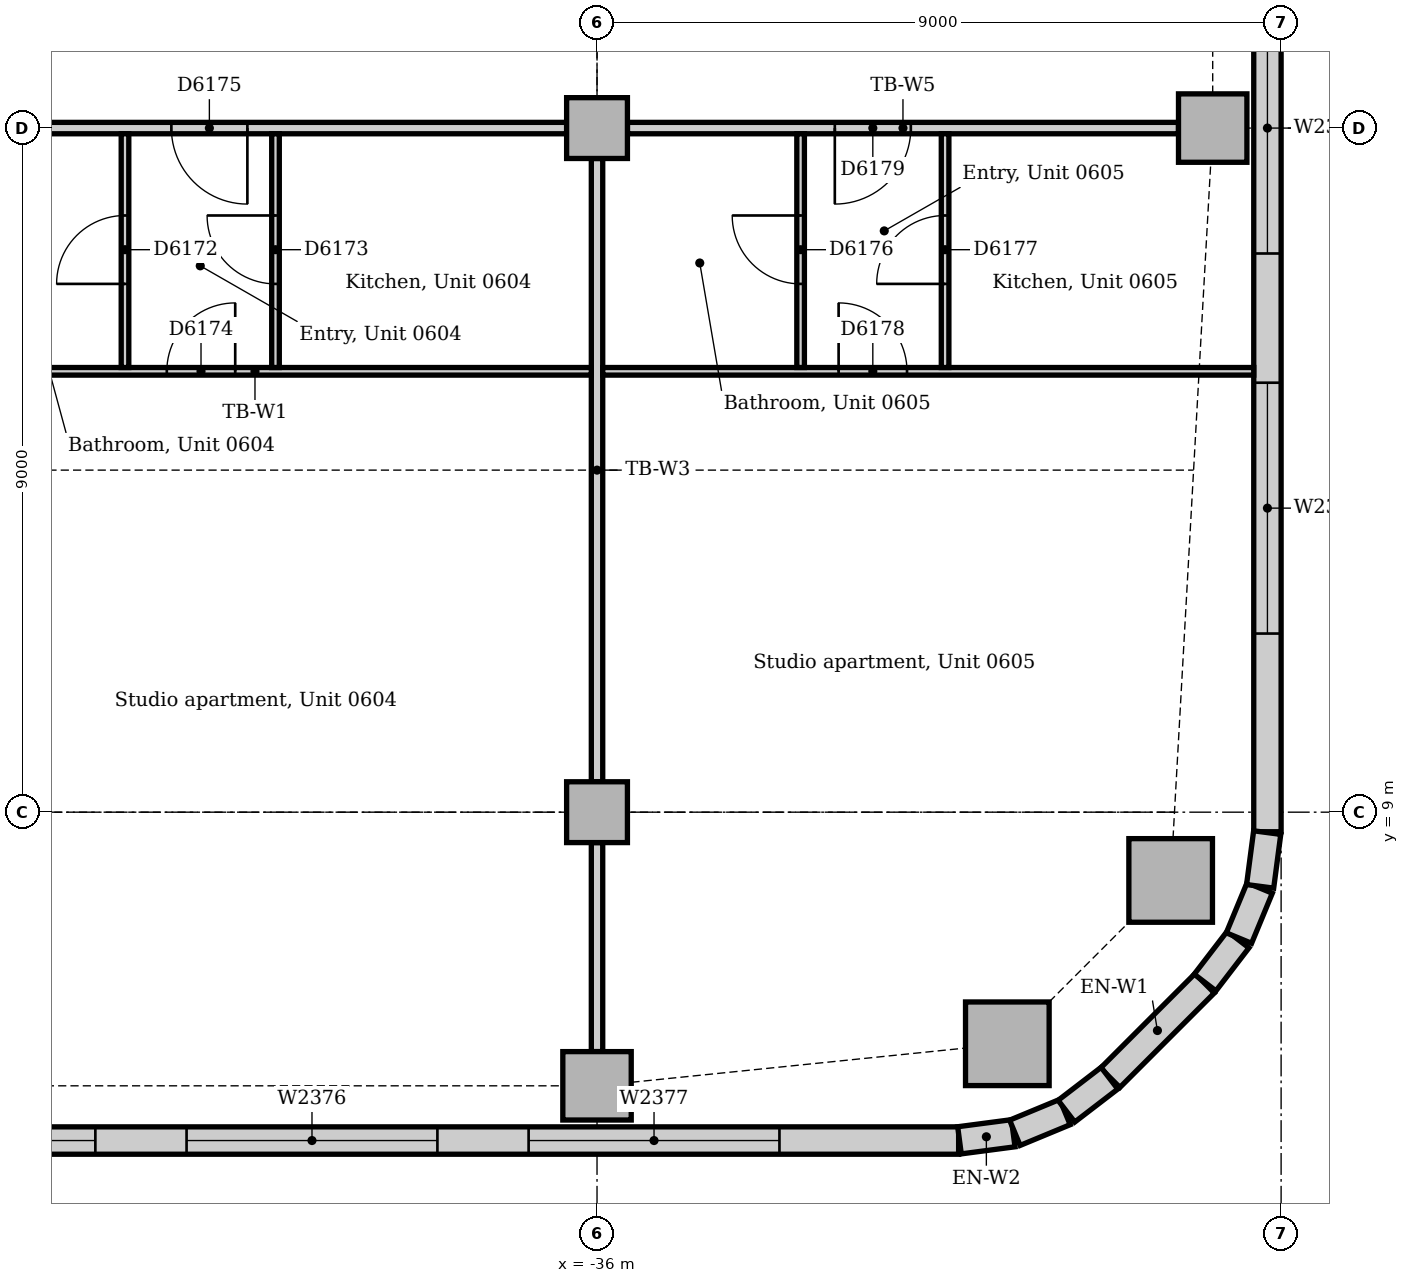
"""IFC4 building model, lengths in metres.
Left out: names, types, materials, properties, quantities, classifications, styles, units other than length and angle.
Written with IfcOpenShell. Run it as: python <this file> out.ifc"""

import sys

from ifc_helpers import new_model, si_unit, direction, frame, frame_2d, origin, origin_2d, place, context, subcontext, project, spatial, rectangle, extrude, element, fill, save


model = new_model("IFC4")
c1 = context("Model", 3, precision=1e-05, world=origin(), true_north=direction((0.0, 1.0)))
c2 = subcontext(c1, "Body", "Model", "MODEL_VIEW")
j1 = project(units=[si_unit("LENGTHUNIT", "METRE"), si_unit("PLANEANGLEUNIT", "RADIAN")], contexts=[c1])
p1 = place(None, origin())
s1 = spatial("IfcSite", under=j1, at=p1, CompositionType="ELEMENT")
p2 = place(p1, origin())
s2 = spatial("IfcBuilding", under=s1, at=p2, CompositionType="ELEMENT")
p3 = place(p2, frame((0.0, 0.0, 30.0)))
s3 = spatial("IfcBuildingStorey", under=s2, at=p3, CompositionType="ELEMENT", Elevation=30.0)
for number, where, z_axis, x_axis in (
    (1, (-30.602, 5.953, 0.0), (0.0, 0.0, 1.0), (1.0, 0.0, 0.0)),
    (2, (-28.453, 8.102, 0.0), (0.0, 0.0, 1.0), (1.0, 0.0, 0.0)),
):
    element("IfcColumn", number, at=place(p3, frame(where, z_axis=z_axis, x_axis=x_axis)), inside=s3, PredefinedType="COLUMN", context=c2, shape_type="SweptSolid", body=[
        extrude(rectangle(XDim=1.1, YDim=1.1, at=origin_2d()), origin(), (0.0, 0.0, 1.0), 3.85),
    ])
for number, where, z_axis, x_axis in (
    (3, (-36.0, 5.4, 0.0), (0.0, 0.0, 1.0), (1.0, 0.0, 0.0)),
    (4, (-27.9, 18.0, 0.0), (0.0, 0.0, 1.0), (1.0, 0.0, 0.0)),
):
    element("IfcColumn", number, at=place(p3, frame(where, z_axis=z_axis, x_axis=x_axis)), inside=s3, PredefinedType="COLUMN", context=c2, shape_type="SweptSolid", body=[
        extrude(rectangle(XDim=0.9, YDim=0.9, at=origin_2d()), origin(), (0.0, 0.0, 1.0), 3.85),
    ])
for number, where, z_axis, x_axis in (
    (5, (-36.0, 9.0, 0.0), (0.0, 0.0, 1.0), (1.0, 0.0, 0.0)),
    (6, (-36.0, 18.0, 0.0), (0.0, 0.0, 1.0), (1.0, 0.0, 0.0)),
):
    element("IfcColumn", number, at=place(p3, frame(where, z_axis=z_axis, x_axis=x_axis)), inside=s3, PredefinedType="COLUMN", context=c2, shape_type="SweptSolid", body=[
        extrude(rectangle(XDim=0.8, YDim=0.8, at=origin_2d()), origin(), (0.0, 0.0, 1.0), 3.85),
    ])
p4 = place(p3, frame((-61.757, 4.68, 0.0), z_axis=(0.0, 0.0, 1.0), x_axis=(1.0, 0.0, 0.0)))
e7 = element("IfcWall", 7, at=p4, inside=s3, PredefinedType="STANDARD", context=c2, shape_type="SweptSolid", body=[
    extrude(rectangle(XDim=30.515, YDim=0.36, at=frame_2d((15.257, 0.0))), origin(), (0.0, 0.0, 1.0), 3.85),
])
p5 = place(p4, frame((2.357, 0.0, 0.9)))
e8 = element("IfcOpeningElement", 8, at=p5, cuts=e7, PredefinedType="OPENING", context=c2, shape_type="SweptSolid", body=[
    extrude(rectangle(XDim=3.3, YDim=1.6, at=frame_2d((1.65, 0.8))), frame((0.0, 0.19, 0.0), z_axis=(0.0, -1.0, 0.0), x_axis=(1.0, 0.0, 0.0)), (0.0, 0.0, 1.0), 0.38),
])
p6 = place(p4, frame((6.857, 0.0, 0.9)))
e9 = element("IfcOpeningElement", 9, at=p6, cuts=e7, PredefinedType="OPENING", context=c2, shape_type="SweptSolid", body=[
    extrude(rectangle(XDim=3.3, YDim=1.6, at=frame_2d((1.65, 0.8))), frame((0.0, 0.19, 0.0), z_axis=(0.0, -1.0, 0.0), x_axis=(1.0, 0.0, 0.0)), (0.0, 0.0, 1.0), 0.38),
])
p7 = place(p4, frame((11.357, 0.0, 0.9)))
e10 = element("IfcOpeningElement", 10, at=p7, cuts=e7, PredefinedType="OPENING", context=c2, shape_type="SweptSolid", body=[
    extrude(rectangle(XDim=3.3, YDim=1.6, at=frame_2d((1.65, 0.8))), frame((0.0, 0.19, 0.0), z_axis=(0.0, -1.0, 0.0), x_axis=(1.0, 0.0, 0.0)), (0.0, 0.0, 1.0), 0.38),
])
p8 = place(p4, frame((15.857, 0.0, 0.9)))
e11 = element("IfcOpeningElement", 11, at=p8, cuts=e7, PredefinedType="OPENING", context=c2, shape_type="SweptSolid", body=[
    extrude(rectangle(XDim=3.3, YDim=1.6, at=frame_2d((1.65, 0.8))), frame((0.0, 0.19, 0.0), z_axis=(0.0, -1.0, 0.0), x_axis=(1.0, 0.0, 0.0)), (0.0, 0.0, 1.0), 0.38),
])
p9 = place(p4, frame((20.357, 0.0, 0.9)))
e12 = element("IfcOpeningElement", 12, at=p9, cuts=e7, PredefinedType="OPENING", context=c2, shape_type="SweptSolid", body=[
    extrude(rectangle(XDim=3.3, YDim=1.6, at=frame_2d((1.65, 0.8))), frame((0.0, 0.19, 0.0), z_axis=(0.0, -1.0, 0.0), x_axis=(1.0, 0.0, 0.0)), (0.0, 0.0, 1.0), 0.38),
])
p10 = place(p4, frame((24.857, 0.0, 0.9)))
e13 = element("IfcOpeningElement", 13, at=p10, cuts=e7, PredefinedType="OPENING", context=c2, shape_type="SweptSolid", body=[
    extrude(rectangle(XDim=3.3, YDim=1.6, at=frame_2d((1.65, 0.8))), frame((0.0, 0.19, 0.0), z_axis=(0.0, -1.0, 0.0), x_axis=(1.0, 0.0, 0.0)), (0.0, 0.0, 1.0), 0.38),
])
p11 = place(p3, frame((-29.249, 5.506, 0.0), z_axis=(0.0, 0.0, 1.0), x_axis=(0.707106781187, 0.707106781187, 0.0)))
e14 = element("IfcWall", 14, at=p11, inside=s3, PredefinedType="STANDARD", context=c2, shape_type="SweptSolid", body=[
    extrude(rectangle(XDim=1.757, YDim=0.36, at=frame_2d((0.879, 0.0))), origin(), (0.0, 0.0, 1.0), 3.85),
])
p12 = place(p3, frame((-27.18, 8.743, 0.0), z_axis=(0.0, 0.0, 1.0), x_axis=(0.0, 1.0, 0.0)))
e15 = element("IfcWall", 15, at=p12, inside=s3, PredefinedType="STANDARD", context=c2, shape_type="SweptSolid", body=[
    extrude(rectangle(XDim=12.257, YDim=0.36, at=frame_2d((6.129, 0.0))), origin(), (0.0, 0.0, 1.0), 3.85),
])
p13 = place(p12, frame((2.607, 0.0, 0.9)))
e16 = element("IfcOpeningElement", 16, at=p13, cuts=e15, PredefinedType="OPENING", context=c2, shape_type="SweptSolid", body=[
    extrude(rectangle(XDim=3.3, YDim=1.6, at=frame_2d((1.65, 0.8))), frame((0.0, 0.19, 0.0), z_axis=(0.0, -1.0, 0.0), x_axis=(1.0, 0.0, 0.0)), (0.0, 0.0, 1.0), 0.38),
])
p14 = place(p12, frame((7.607, 0.0, 0.9)))
e17 = element("IfcOpeningElement", 17, at=p14, cuts=e15, PredefinedType="OPENING", context=c2, shape_type="SweptSolid", body=[
    extrude(rectangle(XDim=3.3, YDim=1.6, at=frame_2d((1.65, 0.8))), frame((0.0, 0.19, 0.0), z_axis=(0.0, -1.0, 0.0), x_axis=(1.0, 0.0, 0.0)), (0.0, 0.0, 1.0), 0.38),
])
for number, where, z_axis, x_axis in (
    (18, (-31.231, 4.683, 0.0), (0.0, 0.0, 1.0), (0.991, 0.131, 0.0)),
    (19, (-30.503, 4.782, 0.0), (0.0, 0.0, 1.0), (0.924, 0.383, 0.0)),
):
    element("IfcWall", number, at=place(p3, frame(where, z_axis=z_axis, x_axis=x_axis)), inside=s3, PredefinedType="STANDARD", context=c2, shape_type="SweptSolid", body=[
        extrude(rectangle(XDim=0.713, YDim=0.36, at=frame_2d((0.356, 0.0))), origin(), (0.0, 0.0, 1.0), 3.85),
    ])
for number, where, z_axis, x_axis in (
    (20, (-29.825, 5.066, 0.0), (0.0, 0.0, 1.0), (0.793, 0.609, 0.0)),
    (21, (-28.0, 6.759, 0.0), (0.0, 0.0, 1.0), (0.609, 0.793, 0.0)),
):
    element("IfcWall", number, at=place(p3, frame(where, z_axis=z_axis, x_axis=x_axis)), inside=s3, PredefinedType="STANDARD", context=c2, shape_type="SweptSolid", body=[
        extrude(rectangle(XDim=0.713, YDim=0.36, at=frame_2d((0.357, 0.0))), origin(), (0.0, 0.0, 1.0), 3.85),
    ])
for number, where, z_axis, x_axis in (
    (22, (-27.555, 7.344, 0.0), (0.0, 0.0, 1.0), (0.383, 0.924, 0.0)),
    (23, (-27.276, 8.024, 0.0), (0.0, 0.0, 1.0), (0.131, 0.991, 0.0)),
):
    element("IfcWall", number, at=place(p3, frame(where, z_axis=z_axis, x_axis=x_axis)), inside=s3, PredefinedType="STANDARD", context=c2, shape_type="SweptSolid", body=[
        extrude(rectangle(XDim=0.713, YDim=0.36, at=frame_2d((0.356, 0.0))), origin(), (0.0, 0.0, 1.0), 3.85),
    ])
p15 = place(p3, frame((-35.6, 18.0, 0.0), z_axis=(0.0, 0.0, 1.0), x_axis=(1.0, 0.0, 0.0)))
e24 = element("IfcWall", 24, at=p15, inside=s3, PredefinedType="PARTITIONING", context=c2, shape_type="SweptSolid", body=[
    extrude(rectangle(XDim=7.25, YDim=0.15, at=frame_2d((3.625, 0.0))), origin(), (0.0, 0.0, 1.0), 3.15),
])
p16 = place(p15, frame((2.728, 0.0, 0.0)))
e25 = element("IfcOpeningElement", 25, at=p16, cuts=e24, PredefinedType="OPENING", context=c2, shape_type="SweptSolid", body=[
    extrude(rectangle(XDim=1.0, YDim=2.1, at=frame_2d((0.5, 1.05))), frame((0.0, 0.085, 0.0), z_axis=(0.0, -1.0, 0.0), x_axis=(1.0, 0.0, 0.0)), (0.0, 0.0, 1.0), 0.17),
])
p17 = place(p3, frame((-44.6, 18.0, 0.0), z_axis=(0.0, 0.0, 1.0), x_axis=(1.0, 0.0, 0.0)))
e26 = element("IfcWall", 26, at=p17, inside=s3, PredefinedType="PARTITIONING", context=c2, shape_type="SweptSolid", body=[
    extrude(rectangle(XDim=8.2, YDim=0.15, at=frame_2d((4.1, 0.0))), origin(), (0.0, 0.0, 1.0), 3.15),
])
p18 = place(p17, frame((3.0, 0.0, 0.0)))
e27 = element("IfcOpeningElement", 27, at=p18, cuts=e26, PredefinedType="OPENING", context=c2, shape_type="SweptSolid", body=[
    extrude(rectangle(XDim=1.0, YDim=2.1, at=frame_2d((0.5, 1.05))), frame((0.0, 0.085, 0.0), z_axis=(0.0, -1.0, 0.0), x_axis=(1.0, 0.0, 0.0)), (0.0, 0.0, 1.0), 0.17),
])
p19 = place(p3, frame((-36.0, 9.4, 0.0), z_axis=(0.0, 0.0, 1.0), x_axis=(0.0, 1.0, 0.0)))
e28 = element("IfcWall", 28, at=p19, inside=s3, PredefinedType="PARTITIONING", context=c2, shape_type="SweptSolid", body=[
    extrude(rectangle(XDim=8.2, YDim=0.15, at=frame_2d((4.1, 0.0))), origin(), (0.0, 0.0, 1.0), 3.158),
])
p20 = place(p3, frame((-36.0, 5.85, 0.0), z_axis=(0.0, 0.0, 1.0), x_axis=(0.0, 1.0, 0.0)))
e29 = element("IfcWall", 29, at=p20, inside=s3, PredefinedType="PARTITIONING", context=c2, shape_type="SweptSolid", body=[
    extrude(rectangle(XDim=2.75, YDim=0.15, at=frame_2d((1.375, 0.0))), origin(), (0.0, 0.0, 1.0), 3.652),
])
p21 = place(p3, frame((-44.925, 14.8, 0.0), z_axis=(0.0, 0.0, 1.0), x_axis=(1.0, 0.0, 0.0)))
e30 = element("IfcWall", 30, at=p21, inside=s3, PredefinedType="PARTITIONING", context=c2, shape_type="SweptSolid", body=[
    extrude(rectangle(XDim=8.85, YDim=0.1, at=frame_2d((4.425, 0.0))), origin(), (0.0, 0.0, 1.0), 3.85),
])
p22 = place(p21, frame((3.265, 0.0, 0.0)))
e31 = element("IfcOpeningElement", 31, at=p22, cuts=e30, PredefinedType="OPENING", context=c2, shape_type="SweptSolid", body=[
    extrude(rectangle(XDim=0.9, YDim=2.1, at=frame_2d((0.45, 1.05))), frame((0.0, 0.06, 0.0), z_axis=(0.0, -1.0, 0.0), x_axis=(1.0, 0.0, 0.0)), (0.0, 0.0, 1.0), 0.12),
])
p23 = place(p3, frame((-35.925, 14.8, 0.0), z_axis=(0.0, 0.0, 1.0), x_axis=(1.0, 0.0, 0.0)))
e32 = element("IfcWall", 32, at=p23, inside=s3, PredefinedType="PARTITIONING", context=c2, shape_type="SweptSolid", body=[
    extrude(rectangle(XDim=8.565, YDim=0.1, at=frame_2d((4.282, 0.0))), origin(), (0.0, 0.0, 1.0), 3.85),
])
p24 = place(p23, frame((3.103, 0.0, 0.0)))
e33 = element("IfcOpeningElement", 33, at=p24, cuts=e32, PredefinedType="OPENING", context=c2, shape_type="SweptSolid", body=[
    extrude(rectangle(XDim=0.9, YDim=2.1, at=frame_2d((0.45, 1.05))), frame((0.0, 0.06, 0.0), z_axis=(0.0, -1.0, 0.0), x_axis=(1.0, 0.0, 0.0)), (0.0, 0.0, 1.0), 0.12),
])
p25 = place(p3, frame((-42.21, 14.85, 0.0), z_axis=(0.0, 0.0, 1.0), x_axis=(0.0, 1.0, 0.0)))
e34 = element("IfcWall", 34, at=p25, inside=s3, PredefinedType="PARTITIONING", context=c2, shape_type="SweptSolid", body=[
    extrude(rectangle(XDim=3.075, YDim=0.1, at=frame_2d((1.538, 0.0))), origin(), (0.0, 0.0, 1.0), 3.85),
])
p26 = place(p25, frame((1.1, 0.0, 0.0)))
e35 = element("IfcOpeningElement", 35, at=p26, cuts=e34, PredefinedType="OPENING", context=c2, shape_type="SweptSolid", body=[
    extrude(rectangle(XDim=0.9, YDim=2.1, at=frame_2d((0.45, 1.05))), frame((0.0, 0.06, 0.0), z_axis=(0.0, -1.0, 0.0), x_axis=(1.0, 0.0, 0.0)), (0.0, 0.0, 1.0), 0.12),
])
p27 = place(p3, frame((-40.23, 14.85, 0.0), z_axis=(0.0, 0.0, 1.0), x_axis=(0.0, 1.0, 0.0)))
e36 = element("IfcWall", 36, at=p27, inside=s3, PredefinedType="PARTITIONING", context=c2, shape_type="SweptSolid", body=[
    extrude(rectangle(XDim=3.075, YDim=0.1, at=frame_2d((1.538, 0.0))), origin(), (0.0, 0.0, 1.0), 3.85),
])
p28 = place(p27, frame((1.1, 0.0, 0.0)))
e37 = element("IfcOpeningElement", 37, at=p28, cuts=e36, PredefinedType="OPENING", context=c2, shape_type="SweptSolid", body=[
    extrude(rectangle(XDim=0.9, YDim=2.1, at=frame_2d((0.45, 1.05))), frame((0.0, 0.06, 0.0), z_axis=(0.0, -1.0, 0.0), x_axis=(1.0, 0.0, 0.0)), (0.0, 0.0, 1.0), 0.12),
])
p29 = place(p3, frame((-33.322, 14.85, 0.0), z_axis=(0.0, 0.0, 1.0), x_axis=(0.0, 1.0, 0.0)))
e38 = element("IfcWall", 38, at=p29, inside=s3, PredefinedType="PARTITIONING", context=c2, shape_type="SweptSolid", body=[
    extrude(rectangle(XDim=3.075, YDim=0.1, at=frame_2d((1.538, 0.0))), origin(), (0.0, 0.0, 1.0), 3.85),
])
p30 = place(p29, frame((1.1, 0.0, 0.0)))
e39 = element("IfcOpeningElement", 39, at=p30, cuts=e38, PredefinedType="OPENING", context=c2, shape_type="SweptSolid", body=[
    extrude(rectangle(XDim=0.9, YDim=2.1, at=frame_2d((0.45, 1.05))), frame((0.0, 0.06, 0.0), z_axis=(0.0, -1.0, 0.0), x_axis=(1.0, 0.0, 0.0)), (0.0, 0.0, 1.0), 0.12),
])
p31 = place(p3, frame((-31.421, 14.85, 0.0), z_axis=(0.0, 0.0, 1.0), x_axis=(0.0, 1.0, 0.0)))
e40 = element("IfcWall", 40, at=p31, inside=s3, PredefinedType="PARTITIONING", context=c2, shape_type="SweptSolid", body=[
    extrude(rectangle(XDim=3.075, YDim=0.1, at=frame_2d((1.538, 0.0))), origin(), (0.0, 0.0, 1.0), 3.85),
])
p32 = place(p31, frame((1.1, 0.0, 0.0)))
e41 = element("IfcOpeningElement", 41, at=p32, cuts=e40, PredefinedType="OPENING", context=c2, shape_type="SweptSolid", body=[
    extrude(rectangle(XDim=0.9, YDim=2.1, at=frame_2d((0.45, 1.05))), frame((0.0, 0.06, 0.0), z_axis=(0.0, -1.0, 0.0), x_axis=(1.0, 0.0, 0.0)), (0.0, 0.0, 1.0), 0.12),
])
p33 = place(p8, origin())
e42 = element("IfcWindow", 42, at=p33, inside=s3, PartitioningType="SINGLE_PANEL", PredefinedType="WINDOW", context=c2, shape_type="SweptSolid", body=[
    extrude(rectangle(XDim=3.3, YDim=1.6, at=frame_2d((1.65, 0.8))), frame((0.0, 0.13, 0.0), z_axis=(0.0, -1.0, 0.0), x_axis=(1.0, 0.0, 0.0)), (0.0, 0.0, 1.0), 0.06),
])
fill(e11, e42)
p34 = place(p9, origin())
e43 = element("IfcWindow", 43, at=p34, inside=s3, PartitioningType="SINGLE_PANEL", PredefinedType="WINDOW", context=c2, shape_type="SweptSolid", body=[
    extrude(rectangle(XDim=3.3, YDim=1.6, at=frame_2d((1.65, 0.8))), frame((0.0, 0.13, 0.0), z_axis=(0.0, -1.0, 0.0), x_axis=(1.0, 0.0, 0.0)), (0.0, 0.0, 1.0), 0.06),
])
fill(e12, e43)
p35 = place(p10, origin())
e44 = element("IfcWindow", 44, at=p35, inside=s3, PartitioningType="SINGLE_PANEL", PredefinedType="WINDOW", context=c2, shape_type="SweptSolid", body=[
    extrude(rectangle(XDim=3.3, YDim=1.6, at=frame_2d((1.65, 0.8))), frame((0.0, 0.13, 0.0), z_axis=(0.0, -1.0, 0.0), x_axis=(1.0, 0.0, 0.0)), (0.0, 0.0, 1.0), 0.06),
])
fill(e13, e44)
p36 = place(p13, origin())
e45 = element("IfcWindow", 45, at=p36, inside=s3, PartitioningType="SINGLE_PANEL", PredefinedType="WINDOW", context=c2, shape_type="SweptSolid", body=[
    extrude(rectangle(XDim=3.3, YDim=1.6, at=frame_2d((1.65, 0.8))), frame((0.0, 0.13, 0.0), z_axis=(0.0, -1.0, 0.0), x_axis=(1.0, 0.0, 0.0)), (0.0, 0.0, 1.0), 0.06),
])
fill(e16, e45)
p37 = place(p14, origin())
e46 = element("IfcWindow", 46, at=p37, inside=s3, PartitioningType="SINGLE_PANEL", PredefinedType="WINDOW", context=c2, shape_type="SweptSolid", body=[
    extrude(rectangle(XDim=3.3, YDim=1.6, at=frame_2d((1.65, 0.8))), frame((0.0, 0.13, 0.0), z_axis=(0.0, -1.0, 0.0), x_axis=(1.0, 0.0, 0.0)), (0.0, 0.0, 1.0), 0.06),
])
fill(e17, e46)
p38 = place(p26, origin())
e47 = element("IfcDoor", 47, at=p38, inside=s3, OperationType="SINGLE_SWING_LEFT", PredefinedType="DOOR", context=c2, shape_type="SweptSolid", body=[
    extrude(rectangle(XDim=0.9, YDim=2.1, at=frame_2d((0.45, 1.05))), frame((0.0, 0.025, 0.0), z_axis=(0.0, -1.0, 0.0), x_axis=(1.0, 0.0, 0.0)), (0.0, 0.0, 1.0), 0.05),
])
fill(e35, e47)
p39 = place(p28, origin())
e48 = element("IfcDoor", 48, at=p39, inside=s3, OperationType="SINGLE_SWING_RIGHT", PredefinedType="DOOR", context=c2, shape_type="SweptSolid", body=[
    extrude(rectangle(XDim=0.9, YDim=2.1, at=frame_2d((0.45, 1.05))), frame((0.0, 0.025, 0.0), z_axis=(0.0, -1.0, 0.0), x_axis=(1.0, 0.0, 0.0)), (0.0, 0.0, 1.0), 0.05),
])
fill(e37, e48)
p40 = place(p22, origin())
e49 = element("IfcDoor", 49, at=p40, inside=s3, OperationType="SINGLE_SWING_RIGHT", PredefinedType="DOOR", context=c2, shape_type="SweptSolid", body=[
    extrude(rectangle(XDim=0.9, YDim=2.1, at=frame_2d((0.45, 1.05))), frame((0.0, 0.025, 0.0), z_axis=(0.0, -1.0, 0.0), x_axis=(1.0, 0.0, 0.0)), (0.0, 0.0, 1.0), 0.05),
])
fill(e31, e49)
p41 = place(p18, frame((1.0, 0.0, 0.0), z_axis=(0.0, 0.0, 1.0), x_axis=(-1.0, 0.0, 0.0)))
e50 = element("IfcDoor", 50, at=p41, inside=s3, OperationType="SINGLE_SWING_LEFT", PredefinedType="DOOR", context=c2, shape_type="SweptSolid", body=[
    extrude(rectangle(XDim=1.0, YDim=2.1, at=frame_2d((0.5, 1.05))), frame((0.0, 0.025, 0.0), z_axis=(0.0, -1.0, 0.0), x_axis=(1.0, 0.0, 0.0)), (0.0, 0.0, 1.0), 0.05),
])
fill(e27, e50)
p42 = place(p30, origin())
e51 = element("IfcDoor", 51, at=p42, inside=s3, OperationType="SINGLE_SWING_RIGHT", PredefinedType="DOOR", context=c2, shape_type="SweptSolid", body=[
    extrude(rectangle(XDim=0.9, YDim=2.1, at=frame_2d((0.45, 1.05))), frame((0.0, 0.025, 0.0), z_axis=(0.0, -1.0, 0.0), x_axis=(1.0, 0.0, 0.0)), (0.0, 0.0, 1.0), 0.05),
])
fill(e39, e51)
p43 = place(p32, origin())
e52 = element("IfcDoor", 52, at=p43, inside=s3, OperationType="SINGLE_SWING_LEFT", PredefinedType="DOOR", context=c2, shape_type="SweptSolid", body=[
    extrude(rectangle(XDim=0.9, YDim=2.1, at=frame_2d((0.45, 1.05))), frame((0.0, 0.025, 0.0), z_axis=(0.0, -1.0, 0.0), x_axis=(1.0, 0.0, 0.0)), (0.0, 0.0, 1.0), 0.05),
])
fill(e41, e52)
p44 = place(p24, origin())
e53 = element("IfcDoor", 53, at=p44, inside=s3, OperationType="SINGLE_SWING_LEFT", PredefinedType="DOOR", context=c2, shape_type="SweptSolid", body=[
    extrude(rectangle(XDim=0.9, YDim=2.1, at=frame_2d((0.45, 1.05))), frame((0.0, 0.025, 0.0), z_axis=(0.0, -1.0, 0.0), x_axis=(1.0, 0.0, 0.0)), (0.0, 0.0, 1.0), 0.05),
])
fill(e33, e53)
p45 = place(p16, frame((1.0, 0.0, 0.0), z_axis=(0.0, 0.0, 1.0), x_axis=(-1.0, 0.0, 0.0)))
e54 = element("IfcDoor", 54, at=p45, inside=s3, OperationType="SINGLE_SWING_RIGHT", PredefinedType="DOOR", context=c2, shape_type="SweptSolid", body=[
    extrude(rectangle(XDim=1.0, YDim=2.1, at=frame_2d((0.5, 1.05))), frame((0.0, 0.025, 0.0), z_axis=(0.0, -1.0, 0.0), x_axis=(1.0, 0.0, 0.0)), (0.0, 0.0, 1.0), 0.05),
])
fill(e25, e54)
save(model, sys.argv[1])
